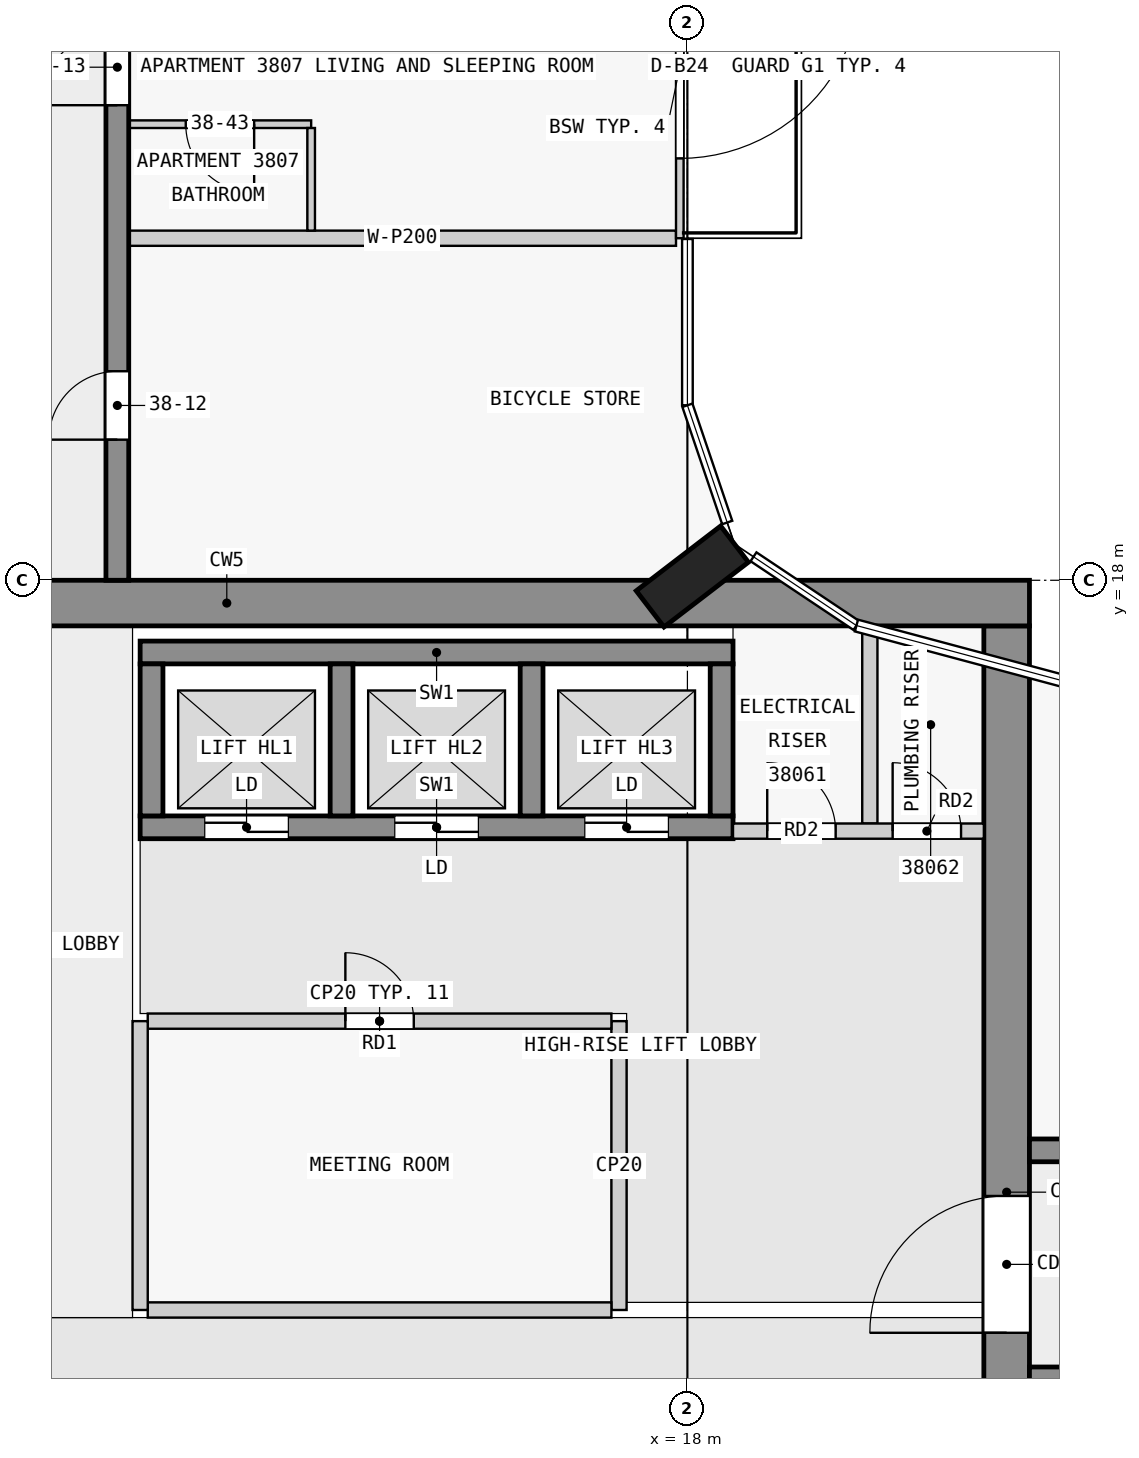
"""IFC4 building model, lengths in metres.
Left out: names, types, materials, properties, quantities, classifications, styles, units other than length and angle.
Written with IfcOpenShell. Run it as: python <this file> out.ifc"""

import sys

from ifc_helpers import new_model, si_unit, direction, frame, frame_2d, origin, origin_2d, place, context, subcontext, project, spatial, rectangle, extrude, element, fill, save


model = new_model("IFC4")
c1 = context("Model", 3, precision=1e-05, world=origin(), true_north=direction((0.0, 1.0)))
c2 = subcontext(c1, "Body", "Model", "MODEL_VIEW")
j1 = project(units=[si_unit("LENGTHUNIT", "METRE"), si_unit("PLANEANGLEUNIT", "RADIAN")], contexts=[c1])
p1 = place(None, origin())
s1 = spatial("IfcSite", under=j1, at=p1, CompositionType="ELEMENT")
p2 = place(p1, origin())
s2 = spatial("IfcBuilding", under=s1, at=p2, CompositionType="ELEMENT")
p3 = place(p2, frame((0.0, 0.0, 149.9)))
s3 = spatial("IfcBuildingStorey", under=s2, at=p3, CompositionType="ELEMENT", Elevation=149.9)
p4 = place(p3, frame((18.065, 18.05, 0.0), z_axis=(0.0, 0.0, 1.0), x_axis=(-0.608810846443, 0.793315418515, 0.0)))
e1 = element("IfcColumn", 1, at=p4, inside=s3, PredefinedType="COLUMN", context=c2, shape_type="SweptSolid", body=[
    extrude(rectangle(XDim=0.6, YDim=1.4, at=origin_2d()), origin(), (0.0, 0.0, 1.0), 3.5),
])
p5 = place(p3, frame((1.38, 17.7, 0.0), z_axis=(0.0, 0.0, 1.0), x_axis=(1.0, 0.0, 0.0)))
e2 = element("IfcWall", 2, at=p5, inside=s3, PredefinedType="SHEAR", context=c2, shape_type="SweptSolid", body=[
    extrude(rectangle(XDim=21.12, YDim=0.6, at=frame_2d((10.56, 0.0))), origin(), (0.0, 0.0, 1.0), 3.25),
])
p6 = place(p5, frame((6.4, 0.0, 0.0)))
e3 = element("IfcOpeningElement", 3, at=p6, cuts=e2, PredefinedType="OPENING", context=c2, shape_type="SweptSolid", body=[
    extrude(rectangle(XDim=1.8, YDim=2.1, at=frame_2d((0.9, 1.05))), frame((0.0, 0.31, 0.0), z_axis=(0.0, -1.0, 0.0), x_axis=(1.0, 0.0, 0.0)), (0.0, 0.0, 1.0), 0.62),
])
p7 = place(p3, frame((22.2, 2.5, 0.0), z_axis=(0.0, 0.0, 1.0), x_axis=(0.0, 1.0, 0.0)))
e4 = element("IfcWall", 4, at=p7, inside=s3, PredefinedType="SHEAR", context=c2, shape_type="SweptSolid", body=[
    extrude(rectangle(XDim=14.9, YDim=0.6, at=frame_2d((7.45, 0.0))), origin(), (0.0, 0.0, 1.0), 3.25),
])
p8 = place(p7, frame((5.6, 0.0, 0.0)))
e5 = element("IfcOpeningElement", 5, at=p8, cuts=e4, PredefinedType="OPENING", context=c2, shape_type="SweptSolid", body=[
    extrude(rectangle(XDim=1.8, YDim=2.1, at=frame_2d((0.9, 1.05))), frame((0.0, 0.31, 0.0), z_axis=(0.0, -1.0, 0.0), x_axis=(1.0, 0.0, 0.0)), (0.0, 0.0, 1.0), 0.62),
])
p9 = place(p3, frame((10.8, 17.05, 0.0), z_axis=(0.0, 0.0, 1.0), x_axis=(1.0, 0.0, 0.0)))
e6 = element("IfcWall", 6, at=p9, inside=s3, PredefinedType="SHEAR", context=c2, shape_type="SweptSolid", body=[
    extrude(rectangle(XDim=7.8, YDim=0.3, at=frame_2d((3.9, 0.0))), origin(), (0.0, 0.0, 1.0), 3.25),
])
p10 = place(p3, frame((10.8, 14.75, 0.0), z_axis=(0.0, 0.0, 1.0), x_axis=(1.0, 0.0, 0.0)))
e7 = element("IfcWall", 7, at=p10, inside=s3, PredefinedType="SHEAR", context=c2, shape_type="SweptSolid", body=[
    extrude(rectangle(XDim=7.8, YDim=0.3, at=frame_2d((3.9, 0.0))), origin(), (0.0, 0.0, 1.0), 3.25),
])
p11 = place(p10, frame((0.85, 0.0, 0.0)))
e8 = element("IfcOpeningElement", 8, at=p11, cuts=e7, PredefinedType="OPENING", context=c2, shape_type="SweptSolid", body=[
    extrude(rectangle(XDim=1.1, YDim=2.1, at=frame_2d((0.55, 1.05))), frame((0.0, 0.16, 0.0), z_axis=(0.0, -1.0, 0.0), x_axis=(1.0, 0.0, 0.0)), (0.0, 0.0, 1.0), 0.32),
])
p12 = place(p10, frame((3.35, 0.0, 0.0)))
e9 = element("IfcOpeningElement", 9, at=p12, cuts=e7, PredefinedType="OPENING", context=c2, shape_type="SweptSolid", body=[
    extrude(rectangle(XDim=1.1, YDim=2.1, at=frame_2d((0.55, 1.05))), frame((0.0, 0.16, 0.0), z_axis=(0.0, -1.0, 0.0), x_axis=(1.0, 0.0, 0.0)), (0.0, 0.0, 1.0), 0.32),
])
p13 = place(p10, frame((5.85, 0.0, 0.0)))
e10 = element("IfcOpeningElement", 10, at=p13, cuts=e7, PredefinedType="OPENING", context=c2, shape_type="SweptSolid", body=[
    extrude(rectangle(XDim=1.1, YDim=2.1, at=frame_2d((0.55, 1.05))), frame((0.0, 0.16, 0.0), z_axis=(0.0, -1.0, 0.0), x_axis=(1.0, 0.0, 0.0)), (0.0, 0.0, 1.0), 0.32),
])
for number, where, z_axis, x_axis in (
    (11, (10.95, 14.9, 0.0), (0.0, 0.0, 1.0), (0.0, 1.0, 0.0)),
    (12, (13.45, 14.9, 0.0), (0.0, 0.0, 1.0), (0.0, 1.0, 0.0)),
    (13, (15.95, 14.9, 0.0), (0.0, 0.0, 1.0), (0.0, 1.0, 0.0)),
    (14, (18.45, 14.9, 0.0), (0.0, 0.0, 1.0), (0.0, 1.0, 0.0)),
):
    element("IfcWall", number, at=place(p3, frame(where, z_axis=z_axis, x_axis=x_axis)), inside=s3, PredefinedType="SHEAR", context=c2, shape_type="SweptSolid", body=[
        extrude(rectangle(XDim=2.0, YDim=0.3, at=frame_2d((1.0, 0.0))), origin(), (0.0, 0.0, 1.0), 3.25),
    ])
p14 = place(p3, frame((22.5, 7.5, 0.0), z_axis=(0.0, 0.0, 1.0), x_axis=(1.0, 0.0, 0.0)))
e15 = element("IfcWall", 15, at=p14, inside=s3, PredefinedType="SHEAR", context=c2, shape_type="SweptSolid", body=[
    extrude(rectangle(XDim=22.5, YDim=0.3, at=frame_2d((11.25, 0.0))), origin(), (0.0, 0.0, 1.0), 3.25),
])
p15 = place(p14, frame((4.05, 0.0, 0.0)))
e16 = element("IfcOpeningElement", 16, at=p15, cuts=e15, PredefinedType="OPENING", context=c2, shape_type="SweptSolid", body=[
    extrude(rectangle(XDim=1.0, YDim=2.1, at=frame_2d((0.5, 1.05))), frame((0.0, 0.16, 0.0), z_axis=(0.0, -1.0, 0.0), x_axis=(1.0, 0.0, 0.0)), (0.0, 0.0, 1.0), 0.32),
])
p16 = place(p14, frame((10.35, 0.0, 0.0)))
e17 = element("IfcOpeningElement", 17, at=p16, cuts=e15, PredefinedType="OPENING", context=c2, shape_type="SweptSolid", body=[
    extrude(rectangle(XDim=1.8, YDim=2.1, at=frame_2d((0.9, 1.05))), frame((0.0, 0.16, 0.0), z_axis=(0.0, -1.0, 0.0), x_axis=(1.0, 0.0, 0.0)), (0.0, 0.0, 1.0), 0.32),
])
p17 = place(p14, frame((16.85, 0.0, 0.0)))
e18 = element("IfcOpeningElement", 18, at=p17, cuts=e15, PredefinedType="OPENING", context=c2, shape_type="SweptSolid", body=[
    extrude(rectangle(XDim=1.0, YDim=2.1, at=frame_2d((0.5, 1.05))), frame((0.0, 0.16, 0.0), z_axis=(0.0, -1.0, 0.0), x_axis=(1.0, 0.0, 0.0)), (0.0, 0.0, 1.0), 0.32),
])
p18 = place(p3, frame((22.5, 10.5, 0.0), z_axis=(0.0, 0.0, 1.0), x_axis=(1.0, 0.0, 0.0)))
e19 = element("IfcWall", 19, at=p18, inside=s3, PredefinedType="SHEAR", context=c2, shape_type="SweptSolid", body=[
    extrude(rectangle(XDim=22.5, YDim=0.3, at=frame_2d((11.25, 0.0))), origin(), (0.0, 0.0, 1.0), 3.25),
])
p19 = place(p18, frame((4.05, 0.0, 0.0)))
e20 = element("IfcOpeningElement", 20, at=p19, cuts=e19, PredefinedType="OPENING", context=c2, shape_type="SweptSolid", body=[
    extrude(rectangle(XDim=1.0, YDim=2.1, at=frame_2d((0.5, 1.05))), frame((0.0, 0.16, 0.0), z_axis=(0.0, -1.0, 0.0), x_axis=(1.0, 0.0, 0.0)), (0.0, 0.0, 1.0), 0.32),
])
p20 = place(p18, frame((11.65, 0.0, 0.0)))
e21 = element("IfcOpeningElement", 21, at=p20, cuts=e19, PredefinedType="OPENING", context=c2, shape_type="SweptSolid", body=[
    extrude(rectangle(XDim=1.0, YDim=2.1, at=frame_2d((0.5, 1.05))), frame((0.0, 0.16, 0.0), z_axis=(0.0, -1.0, 0.0), x_axis=(1.0, 0.0, 0.0)), (0.0, 0.0, 1.0), 0.32),
])
p21 = place(p18, frame((18.75, 0.0, 0.0)))
e22 = element("IfcOpeningElement", 22, at=p21, cuts=e19, PredefinedType="OPENING", context=c2, shape_type="SweptSolid", body=[
    extrude(rectangle(XDim=0.9, YDim=2.1, at=frame_2d((0.45, 1.05))), frame((0.0, 0.16, 0.0), z_axis=(0.0, -1.0, 0.0), x_axis=(1.0, 0.0, 0.0)), (0.0, 0.0, 1.0), 0.32),
])
p22 = place(p18, frame((20.95, 0.0, 0.0)))
e23 = element("IfcOpeningElement", 23, at=p22, cuts=e19, PredefinedType="OPENING", context=c2, shape_type="SweptSolid", body=[
    extrude(rectangle(XDim=1.0, YDim=2.1, at=frame_2d((0.5, 1.05))), frame((0.0, 0.16, 0.0), z_axis=(0.0, -1.0, 0.0), x_axis=(1.0, 0.0, 0.0)), (0.0, 0.0, 1.0), 0.32),
])
p23 = place(p3, frame((10.5, 18.0, 0.0), z_axis=(0.0, 0.0, 1.0), x_axis=(0.0, 1.0, 0.0)))
e24 = element("IfcWall", 24, at=p23, inside=s3, PredefinedType="SHEAR", context=c2, shape_type="SweptSolid", body=[
    extrude(rectangle(XDim=27.0, YDim=0.3, at=frame_2d((13.5, 0.0))), origin(), (0.0, 0.0, 1.0), 3.25),
])
p24 = place(p23, frame((1.85, 0.0, 0.0)))
e25 = element("IfcOpeningElement", 25, at=p24, cuts=e24, PredefinedType="OPENING", context=c2, shape_type="SweptSolid", body=[
    extrude(rectangle(XDim=0.9, YDim=2.1, at=frame_2d((0.45, 1.05))), frame((0.0, 0.16, 0.0), z_axis=(0.0, -1.0, 0.0), x_axis=(1.0, 0.0, 0.0)), (0.0, 0.0, 1.0), 0.32),
])
p25 = place(p23, frame((6.25, 0.0, 0.0)))
e26 = element("IfcOpeningElement", 26, at=p25, cuts=e24, PredefinedType="OPENING", context=c2, shape_type="SweptSolid", body=[
    extrude(rectangle(XDim=1.0, YDim=2.1, at=frame_2d((0.5, 1.05))), frame((0.0, 0.16, 0.0), z_axis=(0.0, -1.0, 0.0), x_axis=(1.0, 0.0, 0.0)), (0.0, 0.0, 1.0), 0.32),
])
p26 = place(p23, frame((10.85, 0.0, 0.0)))
e27 = element("IfcOpeningElement", 27, at=p26, cuts=e24, PredefinedType="OPENING", context=c2, shape_type="SweptSolid", body=[
    extrude(rectangle(XDim=0.9, YDim=2.1, at=frame_2d((0.45, 1.05))), frame((0.0, 0.16, 0.0), z_axis=(0.0, -1.0, 0.0), x_axis=(1.0, 0.0, 0.0)), (0.0, 0.0, 1.0), 0.32),
])
p27 = place(p23, frame((17.55, 0.0, 0.0)))
e28 = element("IfcOpeningElement", 28, at=p27, cuts=e24, PredefinedType="OPENING", context=c2, shape_type="SweptSolid", body=[
    extrude(rectangle(XDim=1.0, YDim=2.1, at=frame_2d((0.5, 1.05))), frame((0.0, 0.16, 0.0), z_axis=(0.0, -1.0, 0.0), x_axis=(1.0, 0.0, 0.0)), (0.0, 0.0, 1.0), 0.32),
])
p28 = place(p23, frame((23.25, 0.0, 0.0)))
e29 = element("IfcOpeningElement", 29, at=p28, cuts=e24, PredefinedType="OPENING", context=c2, shape_type="SweptSolid", body=[
    extrude(rectangle(XDim=0.9, YDim=2.1, at=frame_2d((0.45, 1.05))), frame((0.0, 0.16, 0.0), z_axis=(0.0, -1.0, 0.0), x_axis=(1.0, 0.0, 0.0)), (0.0, 0.0, 1.0), 0.32),
])
p29 = place(p23, frame((25.45, 0.0, 0.0)))
e30 = element("IfcOpeningElement", 30, at=p29, cuts=e24, PredefinedType="OPENING", context=c2, shape_type="SweptSolid", body=[
    extrude(rectangle(XDim=1.0, YDim=2.1, at=frame_2d((0.5, 1.05))), frame((0.0, 0.16, 0.0), z_axis=(0.0, -1.0, 0.0), x_axis=(1.0, 0.0, 0.0)), (0.0, 0.0, 1.0), 0.32),
])
p30 = place(p3, frame((17.9, 27.0, 0.0), z_axis=(0.0, 0.0, 1.0), x_axis=(0.0, -1.0, 0.0)))
e31 = element("IfcWall", 31, at=p30, inside=s3, PredefinedType="STANDARD", context=c2, shape_type="SweptSolid", body=[
    extrude(rectangle(XDim=4.5, YDim=0.1, at=frame_2d((2.25, 0.0))), origin(), (0.0, 0.0, 1.0), 3.25),
])
p31 = place(p30, frame((1.05, 0.0, 0.0)))
e32 = element("IfcOpeningElement", 32, at=p31, cuts=e31, PredefinedType="OPENING", context=c2, shape_type="SweptSolid", body=[
    extrude(rectangle(XDim=2.4, YDim=2.4, at=frame_2d((1.2, 1.2))), frame((0.0, 0.06, 0.0), z_axis=(0.0, -1.0, 0.0), x_axis=(1.0, 0.0, 0.0)), (0.0, 0.0, 1.0), 0.12),
])
p32 = place(p3, frame((10.8, 8.4, 0.0), z_axis=(0.0, 0.0, 1.0), x_axis=(0.0, 1.0, 0.0)))
e33 = element("IfcWall", 33, at=p32, inside=s3, PredefinedType="PARTITIONING", context=c2, shape_type="SweptSolid", body=[
    extrude(rectangle(XDim=3.8, YDim=0.2, at=frame_2d((1.9, 0.0))), origin(), (0.0, 0.0, 1.0), 3.25),
])
p33 = place(p3, frame((10.9, 8.4, 0.0), z_axis=(0.0, 0.0, 1.0), x_axis=(1.0, 0.0, 0.0)))
e34 = element("IfcWall", 34, at=p33, inside=s3, PredefinedType="PARTITIONING", context=c2, shape_type="SweptSolid", body=[
    extrude(rectangle(XDim=6.1, YDim=0.2, at=frame_2d((3.05, 0.0))), origin(), (0.0, 0.0, 1.0), 3.25),
])
p34 = place(p3, frame((17.1, 8.4, 0.0), z_axis=(0.0, 0.0, 1.0), x_axis=(0.0, 1.0, 0.0)))
e35 = element("IfcWall", 35, at=p34, inside=s3, PredefinedType="PARTITIONING", context=c2, shape_type="SweptSolid", body=[
    extrude(rectangle(XDim=3.8, YDim=0.2, at=frame_2d((1.9, 0.0))), origin(), (0.0, 0.0, 1.0), 3.25),
])
p35 = place(p3, frame((10.9, 12.2, 0.0), z_axis=(0.0, 0.0, 1.0), x_axis=(1.0, 0.0, 0.0)))
e36 = element("IfcWall", 36, at=p35, inside=s3, PredefinedType="PARTITIONING", context=c2, shape_type="SweptSolid", body=[
    extrude(rectangle(XDim=6.1, YDim=0.2, at=frame_2d((3.05, 0.0))), origin(), (0.0, 0.0, 1.0), 3.25),
])
p36 = place(p35, frame((2.6, 0.0, 0.0)))
e37 = element("IfcOpeningElement", 37, at=p36, cuts=e36, PredefinedType="OPENING", context=c2, shape_type="SweptSolid", body=[
    extrude(rectangle(XDim=0.9, YDim=2.1, at=frame_2d((0.45, 1.05))), frame((0.0, 0.11, 0.0), z_axis=(0.0, -1.0, 0.0), x_axis=(1.0, 0.0, 0.0)), (0.0, 0.0, 1.0), 0.22),
])
p37 = place(p3, frame((18.6, 14.7, 0.0), z_axis=(0.0, 0.0, 1.0), x_axis=(1.0, 0.0, 0.0)))
e38 = element("IfcWall", 38, at=p37, inside=s3, PredefinedType="PARTITIONING", context=c2, shape_type="SweptSolid", body=[
    extrude(rectangle(XDim=3.3, YDim=0.2, at=frame_2d((1.65, 0.0))), origin(), (0.0, 0.0, 1.0), 3.25),
])
p38 = place(p37, frame((0.45, 0.0, 0.0)))
e39 = element("IfcOpeningElement", 39, at=p38, cuts=e38, PredefinedType="OPENING", context=c2, shape_type="SweptSolid", body=[
    extrude(rectangle(XDim=0.9, YDim=2.1, at=frame_2d((0.45, 1.05))), frame((0.0, 0.11, 0.0), z_axis=(0.0, -1.0, 0.0), x_axis=(1.0, 0.0, 0.0)), (0.0, 0.0, 1.0), 0.22),
])
p39 = place(p37, frame((2.1, 0.0, 0.0)))
e40 = element("IfcOpeningElement", 40, at=p39, cuts=e38, PredefinedType="OPENING", context=c2, shape_type="SweptSolid", body=[
    extrude(rectangle(XDim=0.9, YDim=2.1, at=frame_2d((0.45, 1.05))), frame((0.0, 0.11, 0.0), z_axis=(0.0, -1.0, 0.0), x_axis=(1.0, 0.0, 0.0)), (0.0, 0.0, 1.0), 0.22),
])
p40 = place(p3, frame((20.4, 14.8, 0.0), z_axis=(0.0, 0.0, 1.0), x_axis=(0.0, 1.0, 0.0)))
e41 = element("IfcWall", 41, at=p40, inside=s3, PredefinedType="PARTITIONING", context=c2, shape_type="SweptSolid", body=[
    extrude(rectangle(XDim=2.6, YDim=0.2, at=frame_2d((1.3, 0.0))), origin(), (0.0, 0.0, 1.0), 3.25),
])
p41 = place(p3, frame((17.85, 22.5, 0.0), z_axis=(0.0, 0.0, 1.0), x_axis=(-1.0, 0.0, 0.0)))
e42 = element("IfcWall", 42, at=p41, inside=s3, PredefinedType="PARTITIONING", context=c2, shape_type="SweptSolid", body=[
    extrude(rectangle(XDim=7.2, YDim=0.2, at=frame_2d((3.6, 0.0))), origin(), (0.0, 0.0, 1.0), 3.25),
])
p42 = place(p3, frame((13.05, 24.0, 0.0), z_axis=(0.0, 0.0, 1.0), x_axis=(-1.0, 0.0, 0.0)))
e43 = element("IfcWall", 43, at=p42, inside=s3, PredefinedType="PARTITIONING", context=c2, shape_type="SweptSolid", body=[
    extrude(rectangle(XDim=2.4, YDim=0.1, at=frame_2d((1.2, 0.0))), origin(), (0.0, 0.0, 1.0), 3.25),
])
p43 = place(p42, frame((0.75, 0.0, 0.0)))
e44 = element("IfcOpeningElement", 44, at=p43, cuts=e43, PredefinedType="OPENING", context=c2, shape_type="SweptSolid", body=[
    extrude(rectangle(XDim=0.9, YDim=2.1, at=frame_2d((0.45, 1.05))), frame((0.0, 0.06, 0.0), z_axis=(0.0, -1.0, 0.0), x_axis=(1.0, 0.0, 0.0)), (0.0, 0.0, 1.0), 0.12),
])
p44 = place(p3, frame((13.05, 22.6, 0.0), z_axis=(0.0, 0.0, 1.0), x_axis=(0.0, 1.0, 0.0)))
e45 = element("IfcWall", 45, at=p44, inside=s3, PredefinedType="PARTITIONING", context=c2, shape_type="SweptSolid", body=[
    extrude(rectangle(XDim=1.35, YDim=0.1, at=frame_2d((0.675, 0.0))), origin(), (0.0, 0.0, 1.0), 3.25),
])
p45 = place(p31, origin())
e46 = element("IfcDoor", 46, at=p45, inside=s3, OperationType="SINGLE_SWING_LEFT", PredefinedType="DOOR", context=c2, shape_type="SweptSolid", body=[
    extrude(rectangle(XDim=2.4, YDim=2.4, at=frame_2d((1.2, 1.2))), frame((0.0, 0.025, 0.0), z_axis=(0.0, -1.0, 0.0), x_axis=(1.0, 0.0, 0.0)), (0.0, 0.0, 1.0), 0.05),
])
fill(e32, e46)
p46 = place(p36, origin())
e47 = element("IfcDoor", 47, at=p46, inside=s3, OperationType="SINGLE_SWING_LEFT", PredefinedType="DOOR", context=c2, shape_type="SweptSolid", body=[
    extrude(rectangle(XDim=0.9, YDim=2.1, at=frame_2d((0.45, 1.05))), frame((0.0, 0.025, 0.0), z_axis=(0.0, -1.0, 0.0), x_axis=(1.0, 0.0, 0.0)), (0.0, 0.0, 1.0), 0.05),
])
fill(e37, e47)
p47 = place(p11, origin())
e48 = element("IfcDoor", 48, at=p47, inside=s3, OperationType="DOUBLE_DOOR_SLIDING", PredefinedType="DOOR", context=c2, shape_type="SweptSolid", body=[
    extrude(rectangle(XDim=1.1, YDim=2.1, at=frame_2d((0.55, 1.05))), frame((0.0, 0.025, 0.0), z_axis=(0.0, -1.0, 0.0), x_axis=(1.0, 0.0, 0.0)), (0.0, 0.0, 1.0), 0.05),
])
fill(e8, e48)
p48 = place(p12, origin())
e49 = element("IfcDoor", 49, at=p48, inside=s3, OperationType="DOUBLE_DOOR_SLIDING", PredefinedType="DOOR", context=c2, shape_type="SweptSolid", body=[
    extrude(rectangle(XDim=1.1, YDim=2.1, at=frame_2d((0.55, 1.05))), frame((0.0, 0.025, 0.0), z_axis=(0.0, -1.0, 0.0), x_axis=(1.0, 0.0, 0.0)), (0.0, 0.0, 1.0), 0.05),
])
fill(e9, e49)
p49 = place(p13, origin())
e50 = element("IfcDoor", 50, at=p49, inside=s3, OperationType="DOUBLE_DOOR_SLIDING", PredefinedType="DOOR", context=c2, shape_type="SweptSolid", body=[
    extrude(rectangle(XDim=1.1, YDim=2.1, at=frame_2d((0.55, 1.05))), frame((0.0, 0.025, 0.0), z_axis=(0.0, -1.0, 0.0), x_axis=(1.0, 0.0, 0.0)), (0.0, 0.0, 1.0), 0.05),
])
fill(e10, e50)
p50 = place(p8, origin())
e51 = element("IfcDoor", 51, at=p50, inside=s3, OperationType="DOUBLE_DOOR_SINGLE_SWING", PredefinedType="DOOR", context=c2, shape_type="SweptSolid", body=[
    extrude(rectangle(XDim=1.8, YDim=2.1, at=frame_2d((0.9, 1.05))), frame((0.0, 0.025, 0.0), z_axis=(0.0, -1.0, 0.0), x_axis=(1.0, 0.0, 0.0)), (0.0, 0.0, 1.0), 0.05),
])
fill(e5, e51)
p51 = place(p38, origin())
e52 = element("IfcDoor", 52, at=p51, inside=s3, OperationType="SINGLE_SWING_LEFT", PredefinedType="DOOR", context=c2, shape_type="SweptSolid", body=[
    extrude(rectangle(XDim=0.9, YDim=2.1, at=frame_2d((0.45, 1.05))), frame((0.0, 0.025, 0.0), z_axis=(0.0, -1.0, 0.0), x_axis=(1.0, 0.0, 0.0)), (0.0, 0.0, 1.0), 0.05),
])
fill(e39, e52)
p52 = place(p39, origin())
e53 = element("IfcDoor", 53, at=p52, inside=s3, OperationType="SINGLE_SWING_LEFT", PredefinedType="DOOR", context=c2, shape_type="SweptSolid", body=[
    extrude(rectangle(XDim=0.9, YDim=2.1, at=frame_2d((0.45, 1.05))), frame((0.0, 0.025, 0.0), z_axis=(0.0, -1.0, 0.0), x_axis=(1.0, 0.0, 0.0)), (0.0, 0.0, 1.0), 0.05),
])
fill(e40, e53)
p53 = place(p24, origin())
e54 = element("IfcDoor", 54, at=p53, inside=s3, OperationType="SINGLE_SWING_LEFT", PredefinedType="DOOR", context=c2, shape_type="SweptSolid", body=[
    extrude(rectangle(XDim=0.9, YDim=2.1, at=frame_2d((0.45, 1.05))), frame((0.0, 0.025, 0.0), z_axis=(0.0, -1.0, 0.0), x_axis=(1.0, 0.0, 0.0)), (0.0, 0.0, 1.0), 0.05),
])
fill(e25, e54)
p54 = place(p25, origin())
e55 = element("IfcDoor", 55, at=p54, inside=s3, OperationType="SINGLE_SWING_LEFT", PredefinedType="DOOR", context=c2, shape_type="SweptSolid", body=[
    extrude(rectangle(XDim=1.0, YDim=2.1, at=frame_2d((0.5, 1.05))), frame((0.0, 0.025, 0.0), z_axis=(0.0, -1.0, 0.0), x_axis=(1.0, 0.0, 0.0)), (0.0, 0.0, 1.0), 0.05),
])
fill(e26, e55)
p55 = place(p43, origin())
e56 = element("IfcDoor", 56, at=p55, inside=s3, OperationType="SINGLE_SWING_LEFT", PredefinedType="DOOR", context=c2, shape_type="SweptSolid", body=[
    extrude(rectangle(XDim=0.9, YDim=2.1, at=frame_2d((0.45, 1.05))), frame((0.0, 0.025, 0.0), z_axis=(0.0, -1.0, 0.0), x_axis=(1.0, 0.0, 0.0)), (0.0, 0.0, 1.0), 0.05),
])
fill(e44, e56)
save(model, sys.argv[1])
